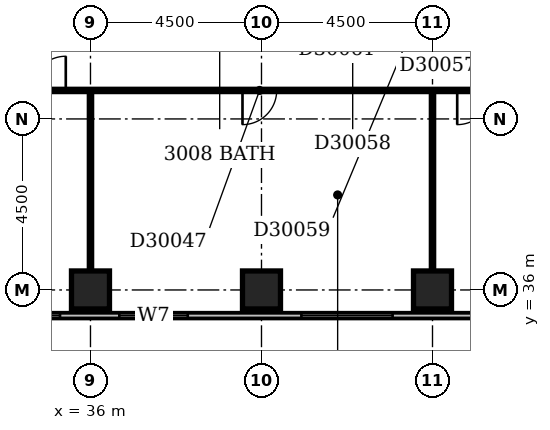
"""IFC4 building model, lengths in metres.
Left out: names, types, materials, properties, quantities, classifications, styles, units other than length and angle.
Written with IfcOpenShell. Run it as: python <this file> out.ifc"""

import sys

from ifc_helpers import new_model, si_unit, direction, frame, frame_2d, origin, origin_2d, place, context, subcontext, project, spatial, rectangle, extrude, element, fill, save


model = new_model("IFC4")
c1 = context("Model", 3, precision=1e-05, world=origin(), true_north=direction((0.0, 1.0)))
c2 = subcontext(c1, "Body", "Model", "MODEL_VIEW")
j1 = project(units=[si_unit("LENGTHUNIT", "METRE"), si_unit("PLANEANGLEUNIT", "RADIAN")], contexts=[c1])
p1 = place(None, origin())
s1 = spatial("IfcSite", under=j1, at=p1, CompositionType="ELEMENT")
p2 = place(p1, origin())
s2 = spatial("IfcBuilding", under=s1, at=p2, CompositionType="ELEMENT")
p3 = place(p2, frame((0.0, 0.0, 123.2)))
s3 = spatial("IfcBuildingStorey", under=s2, at=p3, CompositionType="ELEMENT", Elevation=123.2)
for number, where, z_axis, x_axis in (
    (1, (36.0, 36.0, -0.3), (0.0, 0.0, 1.0), (1.0, 0.0, 0.0)),
    (2, (40.5, 36.0, -0.3), (0.0, 0.0, 1.0), (1.0, 0.0, 0.0)),
    (3, (45.0, 36.0, -0.3), (0.0, 0.0, 1.0), (1.0, 0.0, 0.0)),
):
    element("IfcColumn", number, at=place(p3, frame(where, z_axis=z_axis, x_axis=x_axis)), inside=s3, PredefinedType="COLUMN", context=c2, shape_type="SweptSolid", body=[
        extrude(rectangle(XDim=1.0, YDim=1.0, at=origin_2d()), origin(), (0.0, 0.0, 1.0), 3.6),
    ])
p4 = place(p3, frame((23.1, 35.325, 0.0), z_axis=(0.0, 0.0, 1.0), x_axis=(1.0, 0.0, 0.0)))
e4 = element("IfcWall", 4, at=p4, inside=s3, PredefinedType="STANDARD", context=c2, shape_type="SweptSolid", body=[
    extrude(rectangle(XDim=45.15, YDim=0.15, at=frame_2d((22.575, 0.0))), origin(), (0.0, 0.0, 1.0), 2.7),
])
p5 = place(p4, frame((0.45, 0.0, 0.6)))
e5 = element("IfcOpeningElement", 5, at=p5, cuts=e4, PredefinedType="OPENING", context=c2, shape_type="SweptSolid", body=[
    extrude(rectangle(XDim=2.4, YDim=1.8, at=frame_2d((1.2, 0.9))), frame((0.0, 0.087, 0.0), z_axis=(0.0, -1.0, 0.0), x_axis=(1.0, 0.0, 0.0)), (0.0, 0.0, 1.0), 0.174),
])
p6 = place(p4, frame((4.95, 0.0, 0.6)))
e6 = element("IfcOpeningElement", 6, at=p6, cuts=e4, PredefinedType="OPENING", context=c2, shape_type="SweptSolid", body=[
    extrude(rectangle(XDim=2.4, YDim=1.8, at=frame_2d((1.2, 0.9))), frame((0.0, 0.087, 0.0), z_axis=(0.0, -1.0, 0.0), x_axis=(1.0, 0.0, 0.0)), (0.0, 0.0, 1.0), 0.174),
])
p7 = place(p4, frame((10.598, 0.0, 0.6)))
e7 = element("IfcOpeningElement", 7, at=p7, cuts=e4, PredefinedType="OPENING", context=c2, shape_type="SweptSolid", body=[
    extrude(rectangle(XDim=1.5, YDim=1.8, at=frame_2d((0.75, 0.9))), frame((0.0, 0.087, 0.0), z_axis=(0.0, -1.0, 0.0), x_axis=(1.0, 0.0, 0.0)), (0.0, 0.0, 1.0), 0.174),
])
p8 = place(p4, frame((13.66, 0.0, 0.6)))
e8 = element("IfcOpeningElement", 8, at=p8, cuts=e4, PredefinedType="OPENING", context=c2, shape_type="SweptSolid", body=[
    extrude(rectangle(XDim=1.8, YDim=1.8, at=frame_2d((0.9, 0.9))), frame((0.0, 0.087, 0.0), z_axis=(0.0, -1.0, 0.0), x_axis=(1.0, 0.0, 0.0)), (0.0, 0.0, 1.0), 0.174),
])
p9 = place(p4, frame((18.45, 0.0, 0.6)))
e9 = element("IfcOpeningElement", 9, at=p9, cuts=e4, PredefinedType="OPENING", context=c2, shape_type="SweptSolid", body=[
    extrude(rectangle(XDim=2.4, YDim=1.8, at=frame_2d((1.2, 0.9))), frame((0.0, 0.087, 0.0), z_axis=(0.0, -1.0, 0.0), x_axis=(1.0, 0.0, 0.0)), (0.0, 0.0, 1.0), 0.174),
])
p10 = place(p4, frame((22.95, 0.0, 0.6)))
e10 = element("IfcOpeningElement", 10, at=p10, cuts=e4, PredefinedType="OPENING", context=c2, shape_type="SweptSolid", body=[
    extrude(rectangle(XDim=2.4, YDim=1.8, at=frame_2d((1.2, 0.9))), frame((0.0, 0.087, 0.0), z_axis=(0.0, -1.0, 0.0), x_axis=(1.0, 0.0, 0.0)), (0.0, 0.0, 1.0), 0.174),
])
p11 = place(p4, frame((27.45, 0.0, 0.6)))
e11 = element("IfcOpeningElement", 11, at=p11, cuts=e4, PredefinedType="OPENING", context=c2, shape_type="SweptSolid", body=[
    extrude(rectangle(XDim=2.4, YDim=1.8, at=frame_2d((1.2, 0.9))), frame((0.0, 0.087, 0.0), z_axis=(0.0, -1.0, 0.0), x_axis=(1.0, 0.0, 0.0)), (0.0, 0.0, 1.0), 0.174),
])
p12 = place(p4, frame((31.95, 0.0, 0.6)))
e12 = element("IfcOpeningElement", 12, at=p12, cuts=e4, PredefinedType="OPENING", context=c2, shape_type="SweptSolid", body=[
    extrude(rectangle(XDim=2.4, YDim=1.8, at=frame_2d((1.2, 0.9))), frame((0.0, 0.087, 0.0), z_axis=(0.0, -1.0, 0.0), x_axis=(1.0, 0.0, 0.0)), (0.0, 0.0, 1.0), 0.174),
])
p13 = place(p4, frame((36.131, 0.0, 0.6)))
e13 = element("IfcOpeningElement", 13, at=p13, cuts=e4, PredefinedType="OPENING", context=c2, shape_type="SweptSolid", body=[
    extrude(rectangle(XDim=2.4, YDim=1.8, at=frame_2d((1.2, 0.9))), frame((0.0, 0.087, 0.0), z_axis=(0.0, -1.0, 0.0), x_axis=(1.0, 0.0, 0.0)), (0.0, 0.0, 1.0), 0.174),
])
p14 = place(p4, frame((40.95, 0.0, 0.6)))
e14 = element("IfcOpeningElement", 14, at=p14, cuts=e4, PredefinedType="OPENING", context=c2, shape_type="SweptSolid", body=[
    extrude(rectangle(XDim=2.4, YDim=1.8, at=frame_2d((1.2, 0.9))), frame((0.0, 0.087, 0.0), z_axis=(0.0, -1.0, 0.0), x_axis=(1.0, 0.0, 0.0)), (0.0, 0.0, 1.0), 0.174),
])
p15 = place(p3, frame((36.0, 36.5, 0.0), z_axis=(0.0, 0.0, 1.0), x_axis=(0.0, 1.0, 0.0)))
e15 = element("IfcWall", 15, at=p15, inside=s3, PredefinedType="PARTITIONING", context=c2, shape_type="SweptSolid", body=[
    extrude(rectangle(XDim=4.7, YDim=0.1, at=frame_2d((2.35, 0.0))), origin(), (0.0, 0.0, 1.0), 2.4),
])
p16 = place(p3, frame((45.0, 36.5, 0.0), z_axis=(0.0, 0.0, 1.0), x_axis=(0.0, 1.0, 0.0)))
e16 = element("IfcWall", 16, at=p16, inside=s3, PredefinedType="PARTITIONING", context=c2, shape_type="SweptSolid", body=[
    extrude(rectangle(XDim=4.7, YDim=0.1, at=frame_2d((2.35, 0.0))), origin(), (0.0, 0.0, 1.0), 2.6),
])
p17 = place(p3, frame((31.6, 41.25, 0.0), z_axis=(0.0, 0.0, 1.0), x_axis=(1.0, 0.0, 0.0)))
e17 = element("IfcWall", 17, at=p17, inside=s3, PredefinedType="PARTITIONING", context=c2, shape_type="SweptSolid", body=[
    extrude(rectangle(XDim=17.8, YDim=0.1, at=frame_2d((8.9, 0.0))), origin(), (0.0, 0.0, 1.0), 3.3),
])
p18 = place(p17, frame((2.85, 0.0, 0.0)))
e18 = element("IfcOpeningElement", 18, at=p18, cuts=e17, PredefinedType="OPENING", context=c2, shape_type="SweptSolid", body=[
    extrude(rectangle(XDim=0.9, YDim=2.1, at=frame_2d((0.45, 1.05))), frame((0.0, 0.062, 0.0), z_axis=(0.0, -1.0, 0.0), x_axis=(1.0, 0.0, 0.0)), (0.0, 0.0, 1.0), 0.124),
])
p19 = place(p17, frame((8.4, 0.0, 0.0)))
e19 = element("IfcOpeningElement", 19, at=p19, cuts=e17, PredefinedType="OPENING", context=c2, shape_type="SweptSolid", body=[
    extrude(rectangle(XDim=0.9, YDim=2.1, at=frame_2d((0.45, 1.05))), frame((0.0, 0.062, 0.0), z_axis=(0.0, -1.0, 0.0), x_axis=(1.0, 0.0, 0.0)), (0.0, 0.0, 1.0), 0.124),
])
p20 = place(p17, frame((14.05, 0.0, 0.0)))
e20 = element("IfcOpeningElement", 20, at=p20, cuts=e17, PredefinedType="OPENING", context=c2, shape_type="SweptSolid", body=[
    extrude(rectangle(XDim=0.9, YDim=2.1, at=frame_2d((0.45, 1.05))), frame((0.0, 0.062, 0.0), z_axis=(0.0, -1.0, 0.0), x_axis=(1.0, 0.0, 0.0)), (0.0, 0.0, 1.0), 0.124),
])
p21 = place(p7, origin())
e21 = element("IfcWindow", 21, at=p21, inside=s3, PartitioningType="SINGLE_PANEL", PredefinedType="WINDOW", context=c2, shape_type="SweptSolid", body=[
    extrude(rectangle(XDim=1.5, YDim=1.8, at=frame_2d((0.75, 0.9))), frame((0.0, 0.03, 0.0), z_axis=(0.0, -1.0, 0.0), x_axis=(1.0, 0.0, 0.0)), (0.0, 0.0, 1.0), 0.06),
])
fill(e7, e21)
p22 = place(p8, origin())
e22 = element("IfcWindow", 22, at=p22, inside=s3, PartitioningType="SINGLE_PANEL", PredefinedType="WINDOW", context=c2, shape_type="SweptSolid", body=[
    extrude(rectangle(XDim=1.8, YDim=1.8, at=frame_2d((0.9, 0.9))), frame((0.0, 0.03, 0.0), z_axis=(0.0, -1.0, 0.0), x_axis=(1.0, 0.0, 0.0)), (0.0, 0.0, 1.0), 0.06),
])
fill(e8, e22)
p23 = place(p9, origin())
e23 = element("IfcWindow", 23, at=p23, inside=s3, PartitioningType="SINGLE_PANEL", PredefinedType="WINDOW", context=c2, shape_type="SweptSolid", body=[
    extrude(rectangle(XDim=2.4, YDim=1.8, at=frame_2d((1.2, 0.9))), frame((0.0, 0.03, 0.0), z_axis=(0.0, -1.0, 0.0), x_axis=(1.0, 0.0, 0.0)), (0.0, 0.0, 1.0), 0.06),
])
fill(e9, e23)
p24 = place(p18, frame((0.9, 0.0, 0.0), z_axis=(0.0, 0.0, 1.0), x_axis=(-1.0, 0.0, 0.0)))
e24 = element("IfcDoor", 24, at=p24, inside=s3, OperationType="SINGLE_SWING_LEFT", PredefinedType="DOOR", context=c2, shape_type="SweptSolid", body=[
    extrude(rectangle(XDim=0.9, YDim=2.1, at=frame_2d((0.45, 1.05))), frame((0.0, 0.025, 0.0), z_axis=(0.0, -1.0, 0.0), x_axis=(1.0, 0.0, 0.0)), (0.0, 0.0, 1.0), 0.05),
])
fill(e18, e24)
p25 = place(p19, frame((0.9, 0.0, 0.0), z_axis=(0.0, 0.0, 1.0), x_axis=(-1.0, 0.0, 0.0)))
e25 = element("IfcDoor", 25, at=p25, inside=s3, OperationType="SINGLE_SWING_RIGHT", PredefinedType="DOOR", context=c2, shape_type="SweptSolid", body=[
    extrude(rectangle(XDim=0.9, YDim=2.1, at=frame_2d((0.45, 1.05))), frame((0.0, 0.025, 0.0), z_axis=(0.0, -1.0, 0.0), x_axis=(1.0, 0.0, 0.0)), (0.0, 0.0, 1.0), 0.05),
])
fill(e19, e25)
p26 = place(p20, frame((0.9, 0.0, 0.0), z_axis=(0.0, 0.0, 1.0), x_axis=(-1.0, 0.0, 0.0)))
e26 = element("IfcDoor", 26, at=p26, inside=s3, OperationType="SINGLE_SWING_RIGHT", PredefinedType="DOOR", context=c2, shape_type="SweptSolid", body=[
    extrude(rectangle(XDim=0.9, YDim=2.1, at=frame_2d((0.45, 1.05))), frame((0.0, 0.025, 0.0), z_axis=(0.0, -1.0, 0.0), x_axis=(1.0, 0.0, 0.0)), (0.0, 0.0, 1.0), 0.05),
])
fill(e20, e26)
save(model, sys.argv[1])
